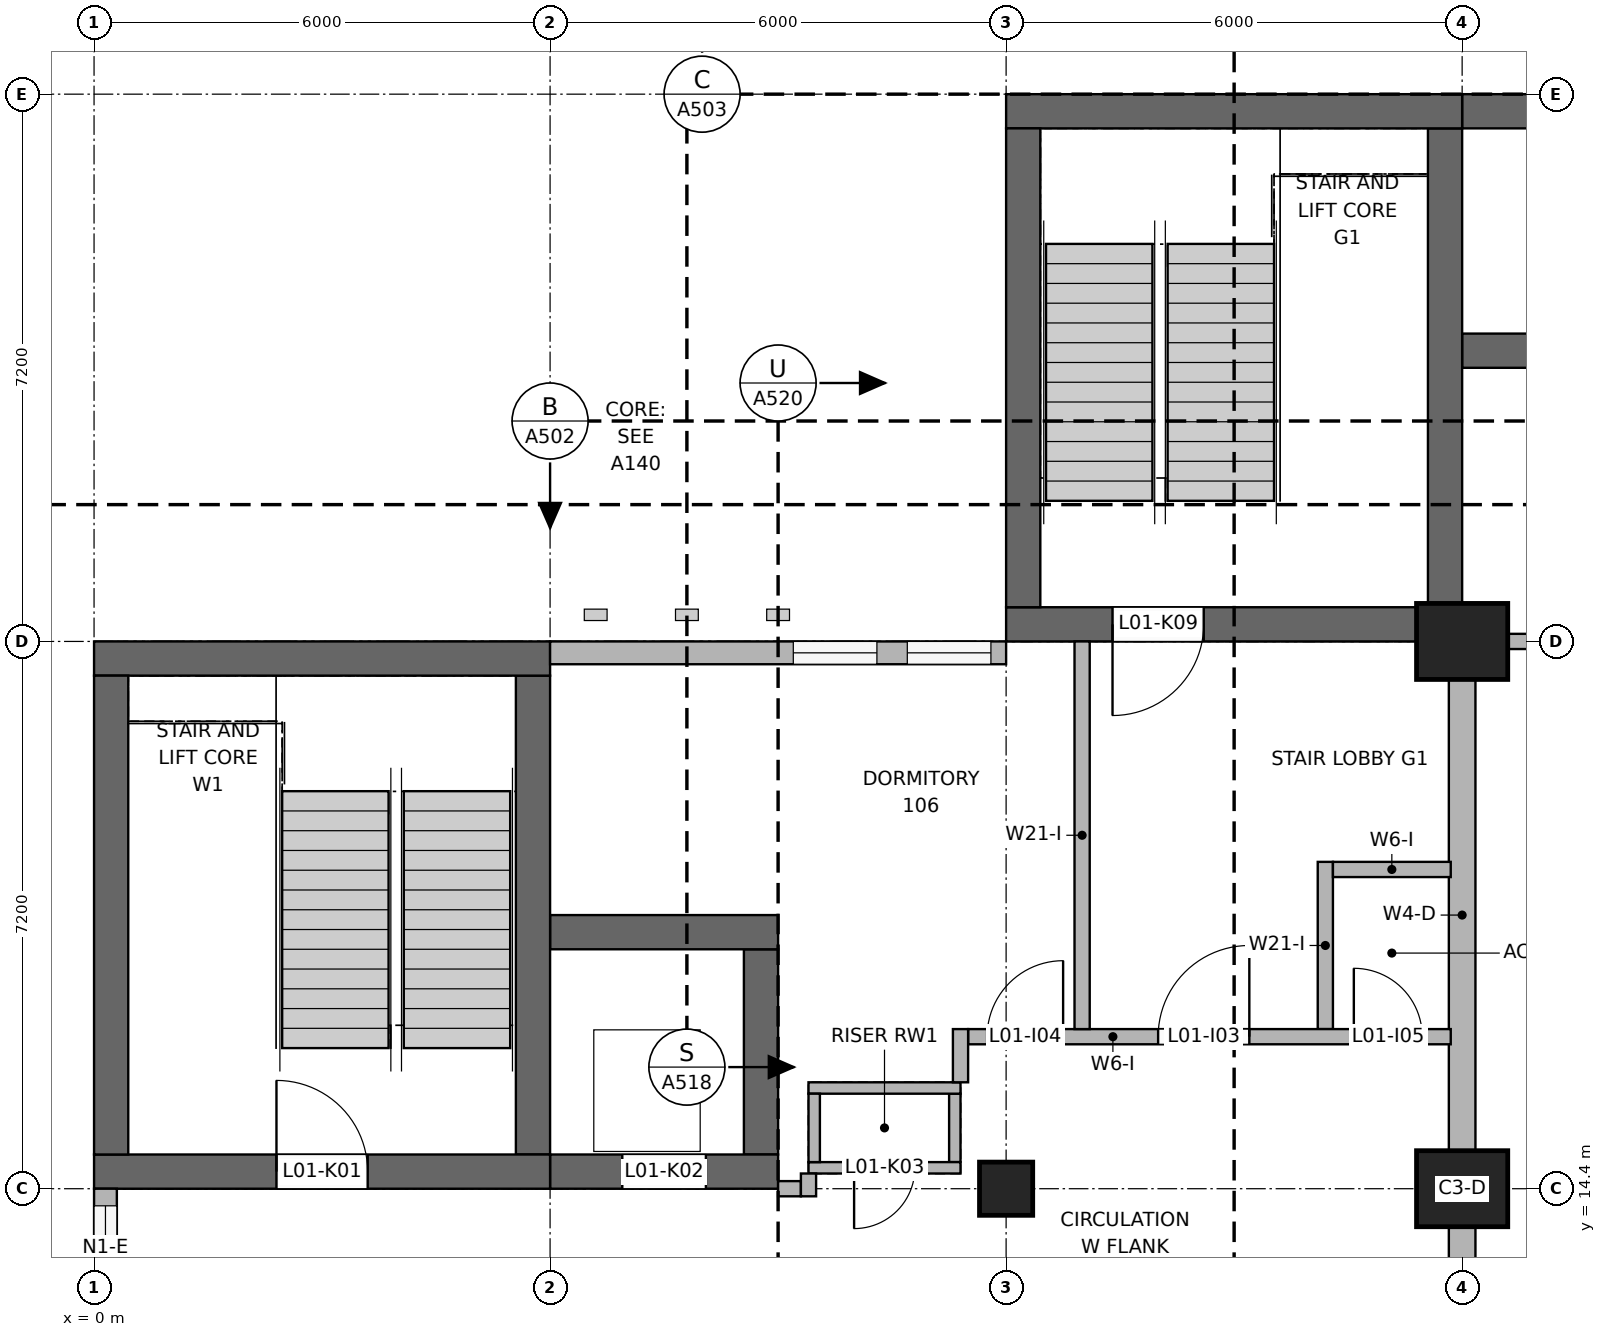
"""IFC4 building model, lengths in metres.
Left out: names, types, materials, properties, quantities, classifications, styles, units other than length and angle.
Written with IfcOpenShell. Run it as: python <this file> out.ifc"""

import sys

from ifc_helpers import new_model, si_unit, direction, frame, frame_2d, origin, origin_2d, place, context, subcontext, project, spatial, rectangle, extrude, element, fill, save


model = new_model("IFC4")
c1 = context("Model", 3, precision=1e-05, world=origin(), true_north=direction((0.0, 1.0)))
c2 = subcontext(c1, "Body", "Model", "MODEL_VIEW")
j1 = project(units=[si_unit("LENGTHUNIT", "METRE"), si_unit("PLANEANGLEUNIT", "RADIAN")], contexts=[c1])
p1 = place(None, origin())
s1 = spatial("IfcSite", under=j1, at=p1, CompositionType="ELEMENT")
p2 = place(p1, origin())
s2 = spatial("IfcBuilding", under=s1, at=p2, CompositionType="ELEMENT")
p3 = place(p2, frame((0.0, 0.0, 4.2)))
s3 = spatial("IfcBuildingStorey", under=s2, at=p3, CompositionType="ELEMENT", Elevation=4.2)
p4 = place(p3, frame((0.0, 14.625, 0.0), z_axis=(0.0, 0.0, 1.0), x_axis=(1.0, 0.0, 0.0)))
e1 = element("IfcWall", 1, at=p4, inside=s3, PredefinedType="SHEAR", context=c2, shape_type="SweptSolid", body=[
    extrude(rectangle(XDim=6.0, YDim=0.45, at=frame_2d((3.0, 0.0))), origin(), (0.0, 0.0, 1.0), 3.95),
])
p5 = place(p4, frame((2.4, 0.0, 0.0)))
e2 = element("IfcOpeningElement", 2, at=p5, cuts=e1, PredefinedType="OPENING", context=c2, shape_type="SweptSolid", body=[
    extrude(rectangle(XDim=1.2, YDim=2.1, at=frame_2d((0.6, 1.05))), frame((0.0, 0.235, 0.0), z_axis=(0.0, -1.0, 0.0), x_axis=(1.0, 0.0, 0.0)), (0.0, 0.0, 1.0), 0.47),
])
p6 = place(p3, frame((0.0, 21.375, 0.0), z_axis=(0.0, 0.0, 1.0), x_axis=(1.0, 0.0, 0.0)))
e3 = element("IfcWall", 3, at=p6, inside=s3, PredefinedType="SHEAR", context=c2, shape_type="SweptSolid", body=[
    extrude(rectangle(XDim=6.0, YDim=0.45, at=frame_2d((3.0, 0.0))), origin(), (0.0, 0.0, 1.0), 3.95),
])
for number, where, z_axis, x_axis in (
    (4, (0.225, 14.85, 0.0), (0.0, 0.0, 1.0), (0.0, 1.0, 0.0)),
    (5, (5.775, 14.85, 0.0), (0.0, 0.0, 1.0), (0.0, 1.0, 0.0)),
):
    element("IfcWall", number, at=place(p3, frame(where, z_axis=z_axis, x_axis=x_axis)), inside=s3, PredefinedType="SHEAR", context=c2, shape_type="SweptSolid", body=[
        extrude(rectangle(XDim=6.3, YDim=0.45, at=frame_2d((3.15, 0.0))), origin(), (0.0, 0.0, 1.0), 3.95),
    ])
p7 = place(p3, frame((6.0, 14.625, 0.0), z_axis=(0.0, 0.0, 1.0), x_axis=(1.0, 0.0, 0.0)))
e6 = element("IfcWall", 6, at=p7, inside=s3, PredefinedType="SHEAR", context=c2, shape_type="SweptSolid", body=[
    extrude(rectangle(XDim=3.0, YDim=0.45, at=frame_2d((1.5, 0.0))), origin(), (0.0, 0.0, 1.0), 4.2),
])
p8 = place(p7, frame((0.95, 0.0, 0.0)))
e7 = element("IfcOpeningElement", 7, at=p8, cuts=e6, PredefinedType="OPENING", context=c2, shape_type="SweptSolid", body=[
    extrude(rectangle(XDim=1.1, YDim=2.1, at=frame_2d((0.55, 1.05))), frame((0.0, 0.235, 0.0), z_axis=(0.0, -1.0, 0.0), x_axis=(1.0, 0.0, 0.0)), (0.0, 0.0, 1.0), 0.47),
])
p9 = place(p3, frame((6.0, 17.775, 0.0), z_axis=(0.0, 0.0, 1.0), x_axis=(1.0, 0.0, 0.0)))
e8 = element("IfcWall", 8, at=p9, inside=s3, PredefinedType="SHEAR", context=c2, shape_type="SweptSolid", body=[
    extrude(rectangle(XDim=3.0, YDim=0.45, at=frame_2d((1.5, 0.0))), origin(), (0.0, 0.0, 1.0), 4.2),
])
p10 = place(p3, frame((8.775, 14.85, 0.0), z_axis=(0.0, 0.0, 1.0), x_axis=(0.0, 1.0, 0.0)))
e9 = element("IfcWall", 9, at=p10, inside=s3, PredefinedType="SHEAR", context=c2, shape_type="SweptSolid", body=[
    extrude(rectangle(XDim=2.7, YDim=0.45, at=frame_2d((1.35, 0.0))), origin(), (0.0, 0.0, 1.0), 4.2),
])
p11 = place(p3, frame((12.0, 21.825, 0.0), z_axis=(0.0, 0.0, 1.0), x_axis=(1.0, 0.0, 0.0)))
e10 = element("IfcWall", 10, at=p11, inside=s3, PredefinedType="SHEAR", context=c2, shape_type="SweptSolid", body=[
    extrude(rectangle(XDim=5.4, YDim=0.45, at=frame_2d((2.7, 0.0))), origin(), (0.0, 0.0, 1.0), 3.75),
])
p12 = place(p11, frame((1.4, 0.0, 0.0)))
e11 = element("IfcOpeningElement", 11, at=p12, cuts=e10, PredefinedType="OPENING", context=c2, shape_type="SweptSolid", body=[
    extrude(rectangle(XDim=1.2, YDim=2.1, at=frame_2d((0.6, 1.05))), frame((0.0, 0.235, 0.0), z_axis=(0.0, -1.0, 0.0), x_axis=(1.0, 0.0, 0.0)), (0.0, 0.0, 1.0), 0.47),
])
p13 = place(p3, frame((12.0, 28.575, 0.0), z_axis=(0.0, 0.0, 1.0), x_axis=(1.0, 0.0, 0.0)))
e12 = element("IfcWall", 12, at=p13, inside=s3, PredefinedType="SHEAR", context=c2, shape_type="SweptSolid", body=[
    extrude(rectangle(XDim=6.0, YDim=0.45, at=frame_2d((3.0, 0.0))), origin(), (0.0, 0.0, 1.0), 3.75),
])
p14 = place(p3, frame((12.225, 22.05, 0.0), z_axis=(0.0, 0.0, 1.0), x_axis=(0.0, 1.0, 0.0)))
e13 = element("IfcWall", 13, at=p14, inside=s3, PredefinedType="SHEAR", context=c2, shape_type="SweptSolid", body=[
    extrude(rectangle(XDim=6.3, YDim=0.45, at=frame_2d((3.15, 0.0))), origin(), (0.0, 0.0, 1.0), 3.75),
])
p15 = place(p3, frame((17.775, 22.1, 0.0), z_axis=(0.0, 0.0, 1.0), x_axis=(0.0, 1.0, 0.0)))
e14 = element("IfcWall", 14, at=p15, inside=s3, PredefinedType="SHEAR", context=c2, shape_type="SweptSolid", body=[
    extrude(rectangle(XDim=6.25, YDim=0.45, at=frame_2d((3.125, 0.0))), origin(), (0.0, 0.0, 1.0), 3.75),
])
for number, where, z_axis, x_axis in (
    (15, (18.0, 25.425, 0.0), (0.0, 0.0, 1.0), (1.0, 0.0, 0.0)),
    (16, (18.0, 28.575, 0.0), (0.0, 0.0, 1.0), (1.0, 0.0, 0.0)),
):
    element("IfcWall", number, at=place(p3, frame(where, z_axis=z_axis, x_axis=x_axis)), inside=s3, PredefinedType="SHEAR", context=c2, shape_type="SweptSolid", body=[
        extrude(rectangle(XDim=3.0, YDim=0.45, at=frame_2d((1.5, 0.0))), origin(), (0.0, 0.0, 1.0), 4.2),
    ])
p16 = place(p3, frame((9.4, 14.675, 0.0), z_axis=(0.0, 0.0, 1.0), x_axis=(1.0, 0.0, 0.0)))
e17 = element("IfcWall", 17, at=p16, inside=s3, PredefinedType="SOLIDWALL", context=c2, shape_type="SweptSolid", body=[
    extrude(rectangle(XDim=2.0, YDim=0.15, at=frame_2d((1.0, 0.0))), origin(), (0.0, 0.0, 1.0), 4.2),
])
p17 = place(p16, frame((0.6, 0.0, 0.0)))
e18 = element("IfcOpeningElement", 18, at=p17, cuts=e17, PredefinedType="OPENING", context=c2, shape_type="SweptSolid", body=[
    extrude(rectangle(XDim=0.8, YDim=2.1, at=frame_2d((0.4, 1.05))), frame((0.0, 0.085, 0.0), z_axis=(0.0, -1.0, 0.0), x_axis=(1.0, 0.0, 0.0)), (0.0, 0.0, 1.0), 0.17),
])
p18 = place(p3, frame((9.4, 15.725, 0.0), z_axis=(0.0, 0.0, 1.0), x_axis=(1.0, 0.0, 0.0)))
e19 = element("IfcWall", 19, at=p18, inside=s3, PredefinedType="SOLIDWALL", context=c2, shape_type="SweptSolid", body=[
    extrude(rectangle(XDim=2.0, YDim=0.15, at=frame_2d((1.0, 0.0))), origin(), (0.0, 0.0, 1.0), 4.2),
])
for number, where, z_axis, x_axis in (
    (20, (9.475, 14.75, 0.0), (0.0, 0.0, 1.0), (0.0, 1.0, 0.0)),
    (21, (11.325, 14.75, 0.0), (0.0, 0.0, 1.0), (0.0, 1.0, 0.0)),
):
    element("IfcWall", number, at=place(p3, frame(where, z_axis=z_axis, x_axis=x_axis)), inside=s3, PredefinedType="SOLIDWALL", context=c2, shape_type="SweptSolid", body=[
        extrude(rectangle(XDim=0.9, YDim=0.15, at=frame_2d((0.45, 0.0))), origin(), (0.0, 0.0, 1.0), 4.2),
    ])
p19 = place(p3, frame((12.0, 14.4, 0.0), z_axis=(0.0, 0.0, 1.0), x_axis=(1.0, 0.0, 0.0)))
e22 = element("IfcColumn", 22, at=p19, inside=s3, PredefinedType="COLUMN", context=c2, shape_type="SweptSolid", body=[
    extrude(rectangle(XDim=0.7, YDim=0.7, at=origin_2d()), origin(), (0.0, 0.0, 1.0), 3.95),
])
for number, where, z_axis, x_axis in (
    (23, (18.0, 14.4, 0.0), (0.0, 0.0, 1.0), (1.0, 0.0, 0.0)),
    (24, (18.0, 21.6, 0.0), (0.0, 0.0, 1.0), (1.0, 0.0, 0.0)),
):
    element("IfcColumn", number, at=place(p3, frame(where, z_axis=z_axis, x_axis=x_axis)), inside=s3, PredefinedType="COLUMN", context=c2, shape_type="SweptSolid", body=[
        extrude(rectangle(XDim=1.2, YDim=1.0, at=origin_2d()), origin(), (0.0, 0.0, 1.0), 4.091),
    ])
p20 = place(p3, frame((18.0, 7.7, 0.0), z_axis=(0.0, 0.0, 1.0), x_axis=(0.0, 1.0, 0.0)))
e25 = element("IfcWall", 25, at=p20, inside=s3, PredefinedType="SOLIDWALL", context=c2, shape_type="SweptSolid", body=[
    extrude(rectangle(XDim=6.2, YDim=0.35, at=frame_2d((3.1, 0.0))), origin(), (0.0, 0.0, 1.0), 3.19),
])
p21 = place(p3, frame((18.0, 14.9, 0.0), z_axis=(0.0, 0.0, 1.0), x_axis=(0.0, 1.0, 0.0)))
e26 = element("IfcWall", 26, at=p21, inside=s3, PredefinedType="SOLIDWALL", context=c2, shape_type="SweptSolid", body=[
    extrude(rectangle(XDim=6.2, YDim=0.35, at=frame_2d((3.1, 0.0))), origin(), (0.0, 0.0, 1.0), 3.19),
])
p22 = place(p3, frame((18.6, 21.6, 1.2), z_axis=(0.0, 0.0, 1.0), x_axis=(1.0, 0.0, 0.0)))
e27 = element("IfcWall", 27, at=p22, inside=s3, PredefinedType="SOLIDWALL", context=c2, shape_type="SweptSolid", body=[
    extrude(rectangle(XDim=4.8, YDim=0.2, at=frame_2d((2.4, 0.0))), origin(), (0.0, 0.0, 1.0), 1.65),
])
p23 = place(p2, origin())
s4 = spatial("IfcBuildingStorey", under=s2, at=p23, CompositionType="ELEMENT", Elevation=0.0)
p24 = place(p23, frame((7.8, 28.8, 0.0), z_axis=(0.0, 0.0, 1.0), x_axis=(1.0, 0.0, 0.0)))
e28 = element("IfcColumn", 28, at=p24, inside=s4, PredefinedType="COLUMN", context=c2, shape_type="SweptSolid", body=[
    extrude(rectangle(XDim=0.5, YDim=0.5, at=origin_2d()), origin(), (0.0, 0.0, 1.0), 7.6),
])
p25 = place(p3, frame((0.15, 7.55, 0.0), z_axis=(0.0, 0.0, 1.0), x_axis=(0.0, 1.0, 0.0)))
e29 = element("IfcWall", 29, at=p25, inside=s3, PredefinedType="SOLIDWALL", context=c2, shape_type="SweptSolid", body=[
    extrude(rectangle(XDim=6.85, YDim=0.3, at=frame_2d((3.425, 0.0))), origin(), (0.0, 0.0, 1.0), 3.05),
])
p26 = place(p25, frame((0.125, 0.0, 0.9)))
e30 = element("IfcOpeningElement", 30, at=p26, cuts=e29, PredefinedType="OPENING", context=c2, shape_type="SweptSolid", body=[
    extrude(rectangle(XDim=1.1, YDim=1.5, at=frame_2d((0.55, 0.75))), frame((0.0, 0.16, 0.0), z_axis=(0.0, -1.0, 0.0), x_axis=(1.0, 0.0, 0.0)), (0.0, 0.0, 1.0), 0.32),
])
p27 = place(p25, frame((1.475, 0.0, 0.9)))
e31 = element("IfcOpeningElement", 31, at=p27, cuts=e29, PredefinedType="OPENING", context=c2, shape_type="SweptSolid", body=[
    extrude(rectangle(XDim=1.1, YDim=1.5, at=frame_2d((0.55, 0.75))), frame((0.0, 0.16, 0.0), z_axis=(0.0, -1.0, 0.0), x_axis=(1.0, 0.0, 0.0)), (0.0, 0.0, 1.0), 0.32),
])
p28 = place(p25, frame((2.825, 0.0, 0.9)))
e32 = element("IfcOpeningElement", 32, at=p28, cuts=e29, PredefinedType="OPENING", context=c2, shape_type="SweptSolid", body=[
    extrude(rectangle(XDim=1.1, YDim=1.5, at=frame_2d((0.55, 0.75))), frame((0.0, 0.16, 0.0), z_axis=(0.0, -1.0, 0.0), x_axis=(1.0, 0.0, 0.0)), (0.0, 0.0, 1.0), 0.32),
])
p29 = place(p25, frame((4.175, 0.0, 0.9)))
e33 = element("IfcOpeningElement", 33, at=p29, cuts=e29, PredefinedType="OPENING", context=c2, shape_type="SweptSolid", body=[
    extrude(rectangle(XDim=1.1, YDim=1.5, at=frame_2d((0.55, 0.75))), frame((0.0, 0.16, 0.0), z_axis=(0.0, -1.0, 0.0), x_axis=(1.0, 0.0, 0.0)), (0.0, 0.0, 1.0), 0.32),
])
p30 = place(p25, frame((5.525, 0.0, 0.9)))
e34 = element("IfcOpeningElement", 34, at=p30, cuts=e29, PredefinedType="OPENING", context=c2, shape_type="SweptSolid", body=[
    extrude(rectangle(XDim=1.1, YDim=1.5, at=frame_2d((0.55, 0.75))), frame((0.0, 0.16, 0.0), z_axis=(0.0, -1.0, 0.0), x_axis=(1.0, 0.0, 0.0)), (0.0, 0.0, 1.0), 0.32),
])
p31 = place(p3, frame((6.0, 21.45, 0.0), z_axis=(0.0, 0.0, 1.0), x_axis=(1.0, 0.0, 0.0)))
e35 = element("IfcWall", 35, at=p31, inside=s3, PredefinedType="SOLIDWALL", context=c2, shape_type="SweptSolid", body=[
    extrude(rectangle(XDim=6.0, YDim=0.3, at=frame_2d((3.0, 0.0))), origin(), (0.0, 0.0, 1.0), 3.05),
])
p32 = place(p31, frame((3.2, 0.0, 0.9)))
e36 = element("IfcOpeningElement", 36, at=p32, cuts=e35, PredefinedType="OPENING", context=c2, shape_type="SweptSolid", body=[
    extrude(rectangle(XDim=1.1, YDim=1.5, at=frame_2d((0.55, 0.75))), frame((0.0, 0.16, 0.0), z_axis=(0.0, -1.0, 0.0), x_axis=(1.0, 0.0, 0.0)), (0.0, 0.0, 1.0), 0.32),
])
p33 = place(p31, frame((4.7, 0.0, 0.9)))
e37 = element("IfcOpeningElement", 37, at=p33, cuts=e35, PredefinedType="OPENING", context=c2, shape_type="SweptSolid", body=[
    extrude(rectangle(XDim=1.1, YDim=1.5, at=frame_2d((0.55, 0.75))), frame((0.0, 0.16, 0.0), z_axis=(0.0, -1.0, 0.0), x_axis=(1.0, 0.0, 0.0)), (0.0, 0.0, 1.0), 0.32),
])
p34 = place(p3, frame((9.4, 14.3, 0.0), z_axis=(0.0, 0.0, 1.0), x_axis=(0.0, 1.0, 0.0)))
e38 = element("IfcWall", 38, at=p34, inside=s3, PredefinedType="PARTITIONING", context=c2, shape_type="SweptSolid", body=[
    extrude(rectangle(XDim=0.3, YDim=0.2, at=frame_2d((0.15, 0.0))), origin(), (0.0, 0.0, 1.0), 3.15),
])
p35 = place(p3, frame((11.4, 15.8, 0.0), z_axis=(0.0, 0.0, 1.0), x_axis=(0.0, 1.0, 0.0)))
e39 = element("IfcWall", 39, at=p35, inside=s3, PredefinedType="PARTITIONING", context=c2, shape_type="SweptSolid", body=[
    extrude(rectangle(XDim=0.7, YDim=0.2, at=frame_2d((0.35, 0.0))), origin(), (0.0, 0.0, 1.0), 3.95),
])
p36 = place(p3, frame((13.0, 16.5, 0.0), z_axis=(0.0, 0.0, 1.0), x_axis=(0.0, 1.0, 0.0)))
e40 = element("IfcWall", 40, at=p36, inside=s3, PredefinedType="PARTITIONING", context=c2, shape_type="SweptSolid", body=[
    extrude(rectangle(XDim=5.1, YDim=0.2, at=frame_2d((2.55, 0.0))), origin(), (0.0, 0.0, 1.0), 3.95),
])
p37 = place(p3, frame((16.2, 16.5, 0.0), z_axis=(0.0, 0.0, 1.0), x_axis=(0.0, 1.0, 0.0)))
e41 = element("IfcWall", 41, at=p37, inside=s3, PredefinedType="PARTITIONING", context=c2, shape_type="SweptSolid", body=[
    extrude(rectangle(XDim=2.2, YDim=0.2, at=frame_2d((1.1, 0.0))), origin(), (0.0, 0.0, 1.0), 3.95),
])
p38 = place(p3, frame((9.0, 14.4, 0.0), z_axis=(0.0, 0.0, 1.0), x_axis=(1.0, 0.0, 0.0)))
e42 = element("IfcWall", 42, at=p38, inside=s3, PredefinedType="PARTITIONING", context=c2, shape_type="SweptSolid", body=[
    extrude(rectangle(XDim=0.3, YDim=0.2, at=frame_2d((0.15, 0.0))), origin(), (0.0, 0.0, 1.0), 3.15),
])
p39 = place(p3, frame((11.5, 16.4, 0.0), z_axis=(0.0, 0.0, 1.0), x_axis=(1.0, 0.0, 0.0)))
e43 = element("IfcWall", 43, at=p39, inside=s3, PredefinedType="PARTITIONING", context=c2, shape_type="SweptSolid", body=[
    extrude(rectangle(XDim=6.35, YDim=0.2, at=frame_2d((3.175, 0.0))), origin(), (0.0, 0.0, 1.0), 3.05),
])
p40 = place(p39, frame((2.5, 0.0, 0.0)))
e44 = element("IfcOpeningElement", 44, at=p40, cuts=e43, PredefinedType="OPENING", context=c2, shape_type="SweptSolid", body=[
    extrude(rectangle(XDim=1.2, YDim=2.1, at=frame_2d((0.6, 1.05))), frame((0.0, 0.11, 0.0), z_axis=(0.0, -1.0, 0.0), x_axis=(1.0, 0.0, 0.0)), (0.0, 0.0, 1.0), 0.22),
])
p41 = place(p39, frame((0.25, 0.0, 0.0)))
e45 = element("IfcOpeningElement", 45, at=p41, cuts=e43, PredefinedType="OPENING", context=c2, shape_type="SweptSolid", body=[
    extrude(rectangle(XDim=1.0, YDim=2.1, at=frame_2d((0.5, 1.05))), frame((0.0, 0.11, 0.0), z_axis=(0.0, -1.0, 0.0), x_axis=(1.0, 0.0, 0.0)), (0.0, 0.0, 1.0), 0.22),
])
p42 = place(p39, frame((5.075, 0.0, 0.0)))
e46 = element("IfcOpeningElement", 46, at=p42, cuts=e43, PredefinedType="OPENING", context=c2, shape_type="SweptSolid", body=[
    extrude(rectangle(XDim=0.9, YDim=2.1, at=frame_2d((0.45, 1.05))), frame((0.0, 0.11, 0.0), z_axis=(0.0, -1.0, 0.0), x_axis=(1.0, 0.0, 0.0)), (0.0, 0.0, 1.0), 0.22),
])
p43 = place(p3, frame((16.3, 18.6, 0.0), z_axis=(0.0, 0.0, 1.0), x_axis=(1.0, 0.0, 0.0)))
e47 = element("IfcWall", 47, at=p43, inside=s3, PredefinedType="PARTITIONING", context=c2, shape_type="SweptSolid", body=[
    extrude(rectangle(XDim=1.55, YDim=0.2, at=frame_2d((0.775, 0.0))), origin(), (0.0, 0.0, 1.0), 3.05),
])
p44 = place(p30, origin())
e48 = element("IfcWindow", 48, at=p44, inside=s3, PartitioningType="SINGLE_PANEL", PredefinedType="WINDOW", context=c2, shape_type="SweptSolid", body=[
    extrude(rectangle(XDim=1.1, YDim=1.5, at=frame_2d((0.55, 0.75))), frame((0.0, 0.03, 0.0), z_axis=(0.0, -1.0, 0.0), x_axis=(1.0, 0.0, 0.0)), (0.0, 0.0, 1.0), 0.06),
])
fill(e34, e48)
p45 = place(p32, origin())
e49 = element("IfcWindow", 49, at=p45, inside=s3, PartitioningType="SINGLE_PANEL", PredefinedType="WINDOW", context=c2, shape_type="SweptSolid", body=[
    extrude(rectangle(XDim=1.1, YDim=1.5, at=frame_2d((0.55, 0.75))), frame((0.0, 0.03, 0.0), z_axis=(0.0, -1.0, 0.0), x_axis=(1.0, 0.0, 0.0)), (0.0, 0.0, 1.0), 0.06),
])
fill(e36, e49)
p46 = place(p33, origin())
e50 = element("IfcWindow", 50, at=p46, inside=s3, PartitioningType="SINGLE_PANEL", PredefinedType="WINDOW", context=c2, shape_type="SweptSolid", body=[
    extrude(rectangle(XDim=1.1, YDim=1.5, at=frame_2d((0.55, 0.75))), frame((0.0, 0.03, 0.0), z_axis=(0.0, -1.0, 0.0), x_axis=(1.0, 0.0, 0.0)), (0.0, 0.0, 1.0), 0.06),
])
fill(e37, e50)
p47 = place(p5, origin())
e51 = element("IfcDoor", 51, at=p47, inside=s3, OperationType="SINGLE_SWING_LEFT", PredefinedType="DOOR", context=c2, shape_type="SweptSolid", body=[
    extrude(rectangle(XDim=1.2, YDim=2.1, at=frame_2d((0.6, 1.05))), frame((0.0, 0.025, 0.0), z_axis=(0.0, -1.0, 0.0), x_axis=(1.0, 0.0, 0.0)), (0.0, 0.0, 1.0), 0.05),
])
fill(e2, e51)
p48 = place(p8, origin())
e52 = element("IfcDoor", 52, at=p48, inside=s3, OperationType="DOUBLE_DOOR_SLIDING", PredefinedType="DOOR", context=c2, shape_type="SweptSolid", body=[
    extrude(rectangle(XDim=1.1, YDim=2.1, at=frame_2d((0.55, 1.05))), frame((0.0, 0.025, 0.0), z_axis=(0.0, -1.0, 0.0), x_axis=(1.0, 0.0, 0.0)), (0.0, 0.0, 1.0), 0.05),
])
fill(e7, e52)
p49 = place(p17, frame((0.8, 0.0, 0.0), z_axis=(0.0, 0.0, 1.0), x_axis=(-1.0, 0.0, 0.0)))
e53 = element("IfcDoor", 53, at=p49, inside=s3, OperationType="SINGLE_SWING_RIGHT", PredefinedType="DOOR", context=c2, shape_type="SweptSolid", body=[
    extrude(rectangle(XDim=0.8, YDim=2.1, at=frame_2d((0.4, 1.05))), frame((0.0, 0.025, 0.0), z_axis=(0.0, -1.0, 0.0), x_axis=(1.0, 0.0, 0.0)), (0.0, 0.0, 1.0), 0.05),
])
fill(e18, e53)
p50 = place(p12, frame((1.2, 0.0, 0.0), z_axis=(0.0, 0.0, 1.0), x_axis=(-1.0, 0.0, 0.0)))
e54 = element("IfcDoor", 54, at=p50, inside=s3, OperationType="SINGLE_SWING_RIGHT", PredefinedType="DOOR", context=c2, shape_type="SweptSolid", body=[
    extrude(rectangle(XDim=1.2, YDim=2.1, at=frame_2d((0.6, 1.05))), frame((0.0, 0.025, 0.0), z_axis=(0.0, -1.0, 0.0), x_axis=(1.0, 0.0, 0.0)), (0.0, 0.0, 1.0), 0.05),
])
fill(e11, e54)
p51 = place(p40, origin())
e55 = element("IfcDoor", 55, at=p51, inside=s3, OperationType="SINGLE_SWING_RIGHT", PredefinedType="DOOR", context=c2, shape_type="SweptSolid", body=[
    extrude(rectangle(XDim=1.2, YDim=2.1, at=frame_2d((0.6, 1.05))), frame((0.0, 0.025, 0.0), z_axis=(0.0, -1.0, 0.0), x_axis=(1.0, 0.0, 0.0)), (0.0, 0.0, 1.0), 0.05),
])
fill(e44, e55)
p52 = place(p41, origin())
e56 = element("IfcDoor", 56, at=p52, inside=s3, OperationType="SINGLE_SWING_RIGHT", PredefinedType="DOOR", context=c2, shape_type="SweptSolid", body=[
    extrude(rectangle(XDim=1.0, YDim=2.1, at=frame_2d((0.5, 1.05))), frame((0.0, 0.025, 0.0), z_axis=(0.0, -1.0, 0.0), x_axis=(1.0, 0.0, 0.0)), (0.0, 0.0, 1.0), 0.05),
])
fill(e45, e56)
p53 = place(p42, origin())
e57 = element("IfcDoor", 57, at=p53, inside=s3, OperationType="SINGLE_SWING_LEFT", PredefinedType="DOOR", context=c2, shape_type="SweptSolid", body=[
    extrude(rectangle(XDim=0.9, YDim=2.1, at=frame_2d((0.45, 1.05))), frame((0.0, 0.025, 0.0), z_axis=(0.0, -1.0, 0.0), x_axis=(1.0, 0.0, 0.0)), (0.0, 0.0, 1.0), 0.05),
])
fill(e46, e57)
save(model, sys.argv[1])
